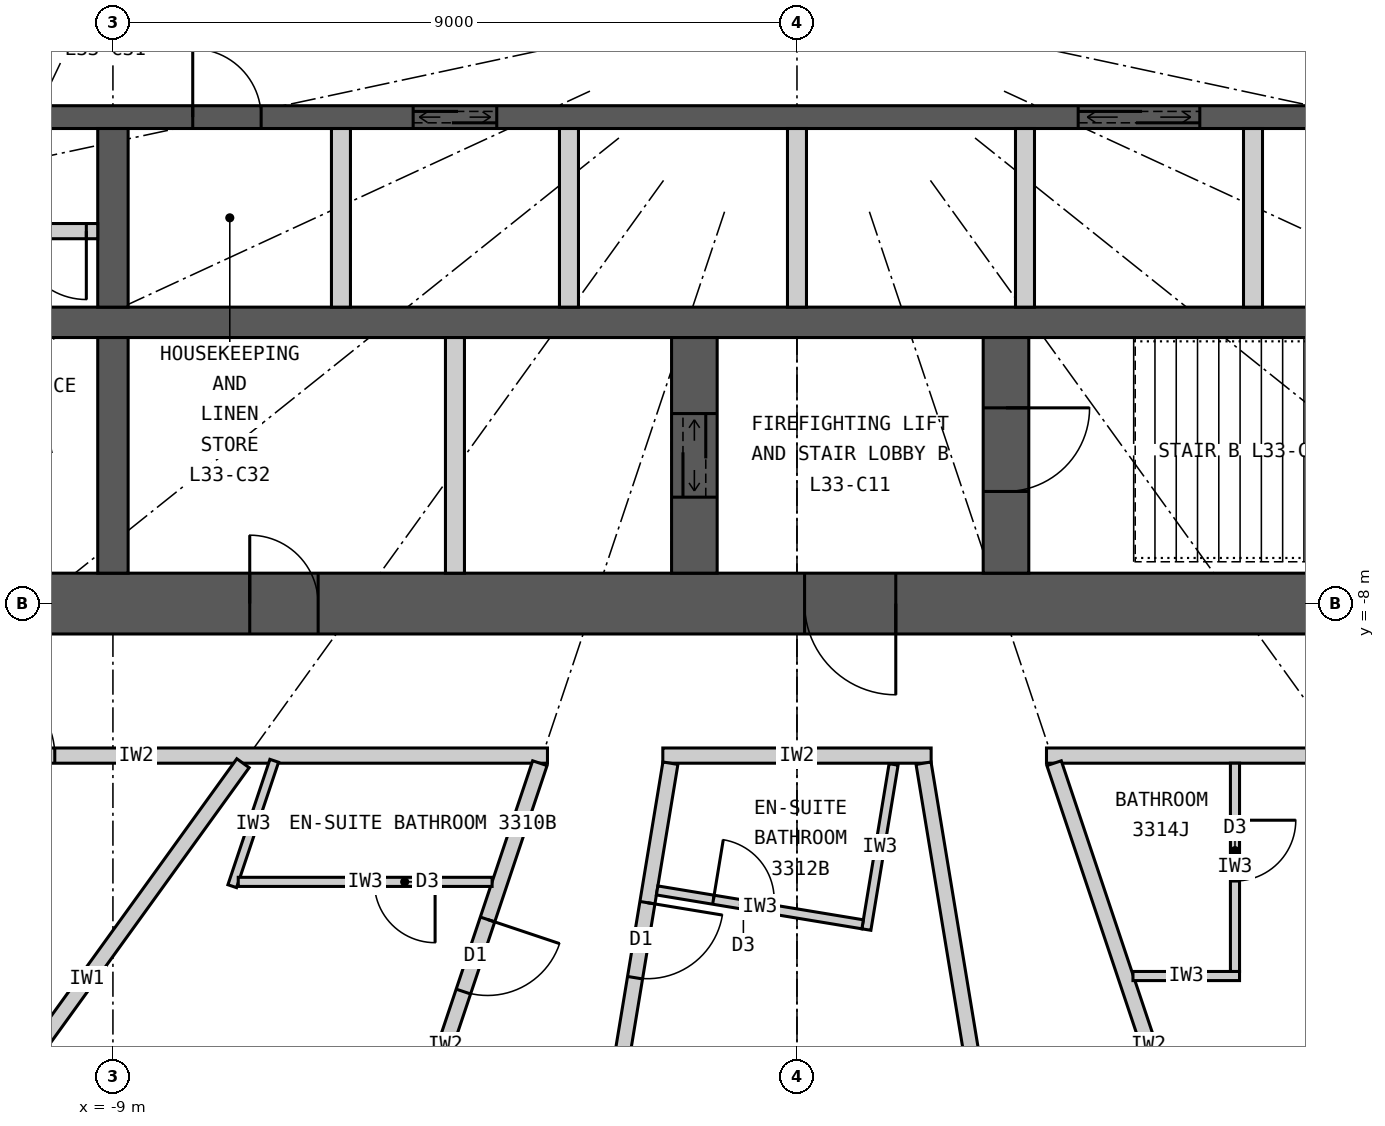
"""IFC4 building model, lengths in metres.
Left out: names, types, materials, properties, quantities, classifications, styles, units other than length and angle.
Written with IfcOpenShell. Run it as: python <this file> out.ifc"""

import sys

from ifc_helpers import new_model, si_unit, direction, frame, frame_2d, origin, place, context, subcontext, project, spatial, rectangle, extrude, element, fill, save


model = new_model("IFC4")
c1 = context("Model", 3, precision=1e-05, world=origin(), true_north=direction((0.0, 1.0)))
c2 = subcontext(c1, "Body", "Model", "MODEL_VIEW")
j1 = project(units=[si_unit("LENGTHUNIT", "METRE"), si_unit("PLANEANGLEUNIT", "RADIAN")], contexts=[c1])
p1 = place(None, origin())
s1 = spatial("IfcSite", under=j1, at=p1, CompositionType="ELEMENT")
p2 = place(p1, origin())
s2 = spatial("IfcBuilding", under=s1, at=p2, CompositionType="ELEMENT")
p3 = place(p2, frame((0.0, 0.0, 128.7)))
s3 = spatial("IfcBuildingStorey", under=s2, at=p3, CompositionType="ELEMENT", Elevation=128.7)
p4 = place(p3, frame((12.4, -8.0, 0.0), z_axis=(0.0, 0.0, 1.0), x_axis=(-1.0, 0.0, 0.0)))
e1 = element("IfcWall", 1, at=p4, inside=s3, PredefinedType="SHEAR", context=c2, shape_type="SweptSolid", body=[
    extrude(rectangle(XDim=24.8, YDim=0.8, at=frame_2d((12.4, 0.0))), origin(), (0.0, 0.0, 1.0), 3.3),
])
p5 = place(p4, frame((11.1, 0.0, 0.0)))
e2 = element("IfcOpeningElement", 2, at=p5, cuts=e1, PredefinedType="OPENING", context=c2, shape_type="SweptSolid", body=[
    extrude(rectangle(XDim=1.2, YDim=2.2, at=frame_2d((0.6, 1.1))), frame((0.0, 0.41, 0.0), z_axis=(0.0, -1.0, 0.0), x_axis=(1.0, 0.0, 0.0)), (0.0, 0.0, 1.0), 0.82),
])
p6 = place(p4, frame((18.7, 0.0, 0.0)))
e3 = element("IfcOpeningElement", 3, at=p6, cuts=e1, PredefinedType="OPENING", context=c2, shape_type="SweptSolid", body=[
    extrude(rectangle(XDim=0.9, YDim=2.2, at=frame_2d((0.45, 1.1))), frame((0.0, 0.41, 0.0), z_axis=(0.0, -1.0, 0.0), x_axis=(1.0, 0.0, 0.0)), (0.0, 0.0, 1.0), 0.82),
])
p7 = place(p3, frame((-11.6, -4.3, 0.0), z_axis=(0.0, 0.0, 1.0), x_axis=(1.0, 0.0, 0.0)))
e4 = element("IfcWall", 4, at=p7, inside=s3, PredefinedType="SHEAR", context=c2, shape_type="SweptSolid", body=[
    extrude(rectangle(XDim=23.2, YDim=0.4, at=frame_2d((11.6, 0.0))), origin(), (0.0, 0.0, 1.0), 3.3),
])
p8 = place(p3, frame((-11.6, -1.6, 0.0), z_axis=(0.0, 0.0, 1.0), x_axis=(1.0, 0.0, 0.0)))
e5 = element("IfcWall", 5, at=p8, inside=s3, PredefinedType="SHEAR", context=c2, shape_type="SweptSolid", body=[
    extrude(rectangle(XDim=23.2, YDim=0.3, at=frame_2d((11.6, 0.0))), origin(), (0.0, 0.0, 1.0), 3.3),
])
p9 = place(p8, frame((6.55, 0.0, 0.0)))
e6 = element("IfcOpeningElement", 6, at=p9, cuts=e5, PredefinedType="OPENING", context=c2, shape_type="SweptSolid", body=[
    extrude(rectangle(XDim=1.1, YDim=2.2, at=frame_2d((0.55, 1.1))), frame((0.0, 0.16, 0.0), z_axis=(0.0, -1.0, 0.0), x_axis=(1.0, 0.0, 0.0)), (0.0, 0.0, 1.0), 0.32),
])
p10 = place(p8, frame((15.3, 0.0, 0.0)))
e7 = element("IfcOpeningElement", 7, at=p10, cuts=e5, PredefinedType="OPENING", context=c2, shape_type="SweptSolid", body=[
    extrude(rectangle(XDim=1.6, YDim=2.4, at=frame_2d((0.8, 1.2))), frame((0.0, 0.16, 0.0), z_axis=(0.0, -1.0, 0.0), x_axis=(1.0, 0.0, 0.0)), (0.0, 0.0, 1.0), 0.32),
])
p11 = place(p8, frame((0.65, 0.0, 0.0)))
e8 = element("IfcOpeningElement", 8, at=p11, cuts=e5, PredefinedType="OPENING", context=c2, shape_type="SweptSolid", body=[
    extrude(rectangle(XDim=0.9, YDim=2.2, at=frame_2d((0.45, 1.1))), frame((0.0, 0.16, 0.0), z_axis=(0.0, -1.0, 0.0), x_axis=(1.0, 0.0, 0.0)), (0.0, 0.0, 1.0), 0.32),
])
p12 = place(p8, frame((3.65, 0.0, 0.0)))
e9 = element("IfcOpeningElement", 9, at=p12, cuts=e5, PredefinedType="OPENING", context=c2, shape_type="SweptSolid", body=[
    extrude(rectangle(XDim=0.9, YDim=2.2, at=frame_2d((0.45, 1.1))), frame((0.0, 0.16, 0.0), z_axis=(0.0, -1.0, 0.0), x_axis=(1.0, 0.0, 0.0)), (0.0, 0.0, 1.0), 0.32),
])
p13 = place(p8, frame((21.65, 0.0, 0.0)))
e10 = element("IfcOpeningElement", 10, at=p13, cuts=e5, PredefinedType="OPENING", context=c2, shape_type="SweptSolid", body=[
    extrude(rectangle(XDim=0.9, YDim=2.2, at=frame_2d((0.45, 1.1))), frame((0.0, 0.16, 0.0), z_axis=(0.0, -1.0, 0.0), x_axis=(1.0, 0.0, 0.0)), (0.0, 0.0, 1.0), 0.32),
])
p14 = place(p3, frame((-9.0, -4.1, 0.0), z_axis=(0.0, 0.0, 1.0), x_axis=(0.0, 1.0, 0.0)))
e11 = element("IfcWall", 11, at=p14, inside=s3, PredefinedType="SHEAR", context=c2, shape_type="SweptSolid", body=[
    extrude(rectangle(XDim=2.35, YDim=0.4, at=frame_2d((1.175, 0.0))), origin(), (0.0, 0.0, 1.0), 3.3),
])
p15 = place(p3, frame((-9.0, -7.6, 0.0), z_axis=(0.0, 0.0, 1.0), x_axis=(0.0, 1.0, 0.0)))
e12 = element("IfcWall", 12, at=p15, inside=s3, PredefinedType="SHEAR", context=c2, shape_type="SweptSolid", body=[
    extrude(rectangle(XDim=3.1, YDim=0.4, at=frame_2d((1.55, 0.0))), origin(), (0.0, 0.0, 1.0), 3.3),
])
p16 = place(p3, frame((2.75, -7.6, 0.0), z_axis=(0.0, 0.0, 1.0), x_axis=(0.0, 1.0, 0.0)))
e13 = element("IfcWall", 13, at=p16, inside=s3, PredefinedType="SHEAR", context=c2, shape_type="SweptSolid", body=[
    extrude(rectangle(XDim=3.1, YDim=0.6, at=frame_2d((1.55, 0.0))), origin(), (0.0, 0.0, 1.0), 3.3),
])
p17 = place(p16, frame((1.075, 0.0, 0.0)))
e14 = element("IfcOpeningElement", 14, at=p17, cuts=e13, PredefinedType="OPENING", context=c2, shape_type="SweptSolid", body=[
    extrude(rectangle(XDim=1.1, YDim=2.2, at=frame_2d((0.55, 1.1))), frame((0.0, 0.31, 0.0), z_axis=(0.0, -1.0, 0.0), x_axis=(1.0, 0.0, 0.0)), (0.0, 0.0, 1.0), 0.62),
])
p18 = place(p3, frame((-1.35, -7.6, 0.0), z_axis=(0.0, 0.0, 1.0), x_axis=(0.0, 1.0, 0.0)))
e15 = element("IfcWall", 15, at=p18, inside=s3, PredefinedType="SHEAR", context=c2, shape_type="SweptSolid", body=[
    extrude(rectangle(XDim=3.1, YDim=0.6, at=frame_2d((1.55, 0.0))), origin(), (0.0, 0.0, 1.0), 3.3),
])
p19 = place(p18, frame((1.0, 0.0, 0.0)))
e16 = element("IfcOpeningElement", 16, at=p19, cuts=e15, PredefinedType="OPENING", context=c2, shape_type="SweptSolid", body=[
    extrude(rectangle(XDim=1.1, YDim=2.2, at=frame_2d((0.55, 1.1))), frame((0.0, 0.31, 0.0), z_axis=(0.0, -1.0, 0.0), x_axis=(1.0, 0.0, 0.0)), (0.0, 0.0, 1.0), 0.62),
])
p20 = place(p3, frame((-4.5, -7.6, 0.0), z_axis=(0.0, 0.0, 1.0), x_axis=(0.0, 1.0, 0.0)))
e17 = element("IfcWall", 17, at=p20, inside=s3, PredefinedType="PARTITIONING", context=c2, shape_type="SweptSolid", body=[
    extrude(rectangle(XDim=3.1, YDim=0.25, at=frame_2d((1.55, 0.0))), origin(), (0.0, 0.0, 1.0), 3.3),
])
for number, where, z_axis, x_axis in (
    (18, (-6.0, -4.1, 0.0), (0.0, 0.0, 1.0), (0.0, 1.0, 0.0)),
    (19, (-3.0, -4.1, 0.0), (0.0, 0.0, 1.0), (0.0, 1.0, 0.0)),
    (20, (0.0, -4.1, 0.0), (0.0, 0.0, 1.0), (0.0, 1.0, 0.0)),
    (21, (3.0, -4.1, 0.0), (0.0, 0.0, 1.0), (0.0, 1.0, 0.0)),
    (22, (6.0, -4.1, 0.0), (0.0, 0.0, 1.0), (0.0, 1.0, 0.0)),
):
    element("IfcWall", number, at=place(p3, frame(where, z_axis=z_axis, x_axis=x_axis)), inside=s3, PredefinedType="PARTITIONING", context=c2, shape_type="SweptSolid", body=[
        extrude(rectangle(XDim=2.35, YDim=0.25, at=frame_2d((1.175, 0.0))), origin(), (0.0, 0.0, 1.0), 3.3),
    ])
p21 = place(p3, frame((14.1, -10.0, 0.0), z_axis=(0.0, 0.0, 1.0), x_axis=(-1.0, 0.0, 0.0)))
e23 = element("IfcWall", 23, at=p21, inside=s3, PredefinedType="PARTITIONING", context=c2, shape_type="SweptSolid", body=[
    extrude(rectangle(XDim=10.817, YDim=0.2, at=frame_2d((5.409, 0.0))), origin(), (0.0, 0.0, 1.0), 3.12),
])
p22 = place(p21, frame((3.035, 0.0, 0.0)))
e24 = element("IfcOpeningElement", 24, at=p22, cuts=e23, PredefinedType="OPENING", context=c2, shape_type="SweptSolid", body=[
    extrude(rectangle(XDim=1.0, YDim=2.2, at=frame_2d((0.5, 1.1))), frame((0.0, 0.11, 0.0), z_axis=(0.0, -1.0, 0.0), x_axis=(1.0, 0.0, 0.0)), (0.0, 0.0, 1.0), 0.22),
])
p23 = place(p3, frame((1.765, -10.0, 0.0), z_axis=(0.0, 0.0, 1.0), x_axis=(-1.0, 0.0, 0.0)))
e25 = element("IfcWall", 25, at=p23, inside=s3, PredefinedType="PARTITIONING", context=c2, shape_type="SweptSolid", body=[
    extrude(rectangle(XDim=3.53, YDim=0.2, at=frame_2d((1.765, 0.0))), origin(), (0.0, 0.0, 1.0), 3.12),
])
p24 = place(p3, frame((-3.283, -10.0, 0.0), z_axis=(0.0, 0.0, 1.0), x_axis=(-1.0, 0.0, 0.0)))
e26 = element("IfcWall", 26, at=p24, inside=s3, PredefinedType="PARTITIONING", context=c2, shape_type="SweptSolid", body=[
    extrude(rectangle(XDim=10.817, YDim=0.2, at=frame_2d((5.409, 0.0))), origin(), (0.0, 0.0, 1.0), 3.12),
])
p25 = place(p24, frame((6.482, 0.0, 0.0)))
e27 = element("IfcOpeningElement", 27, at=p25, cuts=e26, PredefinedType="OPENING", context=c2, shape_type="SweptSolid", body=[
    extrude(rectangle(XDim=1.0, YDim=2.2, at=frame_2d((0.5, 1.1))), frame((0.0, 0.11, 0.0), z_axis=(0.0, -1.0, 0.0), x_axis=(1.0, 0.0, 0.0)), (0.0, 0.0, 1.0), 0.22),
])
p26 = place(p3, frame((-7.289, -10.1, 0.0), z_axis=(0.0, 0.0, 1.0), x_axis=(-0.585217367024, -0.81087645997, 0.0)))
e28 = element("IfcWall", 28, at=p26, inside=s3, PredefinedType="PARTITIONING", context=c2, shape_type="SweptSolid", body=[
    extrude(rectangle(XDim=7.016, YDim=0.2, at=frame_2d((3.508, 0.0))), origin(), (0.0, 0.0, 1.0), 2.37),
])
p27 = place(p3, frame((-3.383, -10.1, 0.0), z_axis=(0.0, 0.0, 1.0), x_axis=(-0.317603705574, -0.948223542318, 0.0)))
e29 = element("IfcWall", 29, at=p27, inside=s3, PredefinedType="PARTITIONING", context=c2, shape_type="SweptSolid", body=[
    extrude(rectangle(XDim=7.823, YDim=0.2, at=frame_2d((3.912, 0.0))), origin(), (0.0, 0.0, 1.0), 2.37),
])
p28 = place(p27, frame((2.168, 0.0, 0.0)))
e30 = element("IfcOpeningElement", 30, at=p28, cuts=e29, PredefinedType="OPENING", context=c2, shape_type="SweptSolid", body=[
    extrude(rectangle(XDim=1.0, YDim=2.2, at=frame_2d((0.5, 1.1))), frame((0.0, 0.11, 0.0), z_axis=(0.0, -1.0, 0.0), x_axis=(1.0, 0.0, 0.0)), (0.0, 0.0, 1.0), 0.22),
])
p29 = place(p3, frame((-1.665, -10.1, 0.0), z_axis=(0.0, 0.0, 1.0), x_axis=(-0.162660519103, -0.986682094459, 0.0)))
e31 = element("IfcWall", 31, at=p29, inside=s3, PredefinedType="PARTITIONING", context=c2, shape_type="SweptSolid", body=[
    extrude(rectangle(XDim=9.111, YDim=0.2, at=frame_2d((4.555, 0.0))), origin(), (0.0, 0.0, 1.0), 3.12),
])
p30 = place(p29, frame((1.86, 0.0, 0.0)))
e32 = element("IfcOpeningElement", 32, at=p30, cuts=e31, PredefinedType="OPENING", context=c2, shape_type="SweptSolid", body=[
    extrude(rectangle(XDim=1.0, YDim=2.2, at=frame_2d((0.5, 1.1))), frame((0.0, 0.11, 0.0), z_axis=(0.0, -1.0, 0.0), x_axis=(1.0, 0.0, 0.0)), (0.0, 0.0, 1.0), 0.22),
])
p31 = place(p3, frame((1.665, -10.1, 0.0), z_axis=(0.0, 0.0, 1.0), x_axis=(0.162660519103, -0.986682094459, 0.0)))
e33 = element("IfcWall", 33, at=p31, inside=s3, PredefinedType="PARTITIONING", context=c2, shape_type="SweptSolid", body=[
    extrude(rectangle(XDim=9.111, YDim=0.2, at=frame_2d((4.555, 0.0))), origin(), (0.0, 0.0, 1.0), 3.12),
])
p32 = place(p3, frame((3.383, -10.1, 0.0), z_axis=(0.0, 0.0, 1.0), x_axis=(0.317603705574, -0.948223542318, 0.0)))
e34 = element("IfcWall", 34, at=p32, inside=s3, PredefinedType="PARTITIONING", context=c2, shape_type="SweptSolid", body=[
    extrude(rectangle(XDim=7.823, YDim=0.2, at=frame_2d((3.912, 0.0))), origin(), (0.0, 0.0, 1.0), 2.37),
])
p33 = place(p3, frame((-6.878, -10.068, 0.0), z_axis=(0.0, 0.0, 1.0), x_axis=(-0.317532394508, -0.948247424694, 0.0)))
e35 = element("IfcWall", 35, at=p33, inside=s3, PredefinedType="PARTITIONING", context=c2, shape_type="SweptSolid", body=[
    extrude(rectangle(XDim=1.74, YDim=0.12, at=frame_2d((0.87, 0.0))), origin(), (0.0, 0.0, 1.0), 3.12),
])
p34 = place(p3, frame((-4.011, -11.661, 0.0), z_axis=(0.0, 0.0, 1.0), x_axis=(-1.0, 0.0, 0.0)))
e36 = element("IfcWall", 36, at=p34, inside=s3, PredefinedType="PARTITIONING", context=c2, shape_type="SweptSolid", body=[
    extrude(rectangle(XDim=3.34, YDim=0.12, at=frame_2d((1.67, 0.0))), origin(), (0.0, 0.0, 1.0), 3.12),
])
p35 = place(p34, frame((0.75, 0.0, 0.0)))
e37 = element("IfcOpeningElement", 37, at=p35, cuts=e36, PredefinedType="OPENING", context=c2, shape_type="SweptSolid", body=[
    extrude(rectangle(XDim=0.8, YDim=2.1, at=frame_2d((0.4, 1.05))), frame((0.0, 0.07, 0.0), z_axis=(0.0, -1.0, 0.0), x_axis=(1.0, 0.0, 0.0)), (0.0, 0.0, 1.0), 0.14),
])
p36 = place(p3, frame((1.271, -10.116, 0.0), z_axis=(0.0, 0.0, 1.0), x_axis=(-0.162672481395, -0.986680122328, 0.0)))
e38 = element("IfcWall", 38, at=p36, inside=s3, PredefinedType="PARTITIONING", context=c2, shape_type="SweptSolid", body=[
    extrude(rectangle(XDim=2.202, YDim=0.12, at=frame_2d((1.101, 0.0))), origin(), (0.0, 0.0, 1.0), 3.12),
])
p37 = place(p3, frame((-1.84, -11.774, 0.0), z_axis=(0.0, 0.0, 1.0), x_axis=(0.986676602341, -0.162693830222, 0.0)))
e39 = element("IfcWall", 39, at=p37, inside=s3, PredefinedType="PARTITIONING", context=c2, shape_type="SweptSolid", body=[
    extrude(rectangle(XDim=2.74, YDim=0.12, at=frame_2d((1.37, 0.0))), origin(), (0.0, 0.0, 1.0), 3.12),
])
p38 = place(p37, frame((0.75, 0.0, 0.0)))
e40 = element("IfcOpeningElement", 40, at=p38, cuts=e39, PredefinedType="OPENING", context=c2, shape_type="SweptSolid", body=[
    extrude(rectangle(XDim=0.8, YDim=2.1, at=frame_2d((0.4, 1.05))), frame((0.0, 0.07, 0.0), z_axis=(0.0, -1.0, 0.0), x_axis=(1.0, 0.0, 0.0)), (0.0, 0.0, 1.0), 0.14),
])
p39 = place(p3, frame((4.421, -12.9, 0.0), z_axis=(0.0, 0.0, 1.0), x_axis=(1.0, 0.0, 0.0)))
e41 = element("IfcWall", 41, at=p39, inside=s3, PredefinedType="PARTITIONING", context=c2, shape_type="SweptSolid", body=[
    extrude(rectangle(XDim=1.402, YDim=0.12, at=frame_2d((0.701, 0.0))), origin(), (0.0, 0.0, 1.0), 3.12),
])
p40 = place(p3, frame((5.763, -10.1, 0.0), z_axis=(0.0, 0.0, 1.0), x_axis=(0.0, -1.0, 0.0)))
e42 = element("IfcWall", 42, at=p40, inside=s3, PredefinedType="PARTITIONING", context=c2, shape_type="SweptSolid", body=[
    extrude(rectangle(XDim=2.74, YDim=0.12, at=frame_2d((1.37, 0.0))), origin(), (0.0, 0.0, 1.0), 3.12),
])
p41 = place(p40, frame((0.75, 0.0, 0.0)))
e43 = element("IfcOpeningElement", 43, at=p41, cuts=e42, PredefinedType="OPENING", context=c2, shape_type="SweptSolid", body=[
    extrude(rectangle(XDim=0.8, YDim=2.1, at=frame_2d((0.4, 1.05))), frame((0.0, 0.07, 0.0), z_axis=(0.0, -1.0, 0.0), x_axis=(1.0, 0.0, 0.0)), (0.0, 0.0, 1.0), 0.14),
])
p42 = place(p3, frame((-11.6, -3.1, 0.0), z_axis=(0.0, 0.0, 1.0), x_axis=(1.0, 0.0, 0.0)))
e44 = element("IfcWall", 44, at=p42, inside=s3, PredefinedType="PARTITIONING", context=c2, shape_type="SweptSolid", body=[
    extrude(rectangle(XDim=2.4, YDim=0.2, at=frame_2d((1.2, 0.0))), origin(), (0.0, 0.0, 1.0), 3.12),
])
p43 = place(p42, frame((1.35, 0.0, 0.0)))
e45 = element("IfcOpeningElement", 45, at=p43, cuts=e44, PredefinedType="OPENING", context=c2, shape_type="SweptSolid", body=[
    extrude(rectangle(XDim=0.9, YDim=2.2, at=frame_2d((0.45, 1.1))), frame((0.0, 0.11, 0.0), z_axis=(0.0, -1.0, 0.0), x_axis=(1.0, 0.0, 0.0)), (0.0, 0.0, 1.0), 0.22),
])
p44 = place(p25, origin())
e46 = element("IfcDoor", 46, at=p44, inside=s3, OperationType="SINGLE_SWING_RIGHT", PredefinedType="DOOR", context=c2, shape_type="SweptSolid", body=[
    extrude(rectangle(XDim=1.0, YDim=2.2, at=frame_2d((0.5, 1.1))), frame((0.0, 0.025, 0.0), z_axis=(0.0, -1.0, 0.0), x_axis=(1.0, 0.0, 0.0)), (0.0, 0.0, 1.0), 0.05),
])
fill(e27, e46)
p45 = place(p35, origin())
e47 = element("IfcDoor", 47, at=p45, inside=s3, OperationType="SINGLE_SWING_LEFT", PredefinedType="DOOR", context=c2, shape_type="SweptSolid", body=[
    extrude(rectangle(XDim=0.8, YDim=2.1, at=frame_2d((0.4, 1.05))), frame((0.0, 0.025, 0.0), z_axis=(0.0, -1.0, 0.0), x_axis=(1.0, 0.0, 0.0)), (0.0, 0.0, 1.0), 0.05),
])
fill(e37, e47)
p46 = place(p28, origin())
e48 = element("IfcDoor", 48, at=p46, inside=s3, OperationType="SINGLE_SWING_LEFT", PredefinedType="DOOR", context=c2, shape_type="SweptSolid", body=[
    extrude(rectangle(XDim=1.0, YDim=2.2, at=frame_2d((0.5, 1.1))), frame((0.0, 0.025, 0.0), z_axis=(0.0, -1.0, 0.0), x_axis=(1.0, 0.0, 0.0)), (0.0, 0.0, 1.0), 0.05),
])
fill(e30, e48)
p47 = place(p38, origin())
e49 = element("IfcDoor", 49, at=p47, inside=s3, OperationType="SINGLE_SWING_LEFT", PredefinedType="DOOR", context=c2, shape_type="SweptSolid", body=[
    extrude(rectangle(XDim=0.8, YDim=2.1, at=frame_2d((0.4, 1.05))), frame((0.0, 0.025, 0.0), z_axis=(0.0, -1.0, 0.0), x_axis=(1.0, 0.0, 0.0)), (0.0, 0.0, 1.0), 0.05),
])
fill(e40, e49)
p48 = place(p30, origin())
e50 = element("IfcDoor", 50, at=p48, inside=s3, OperationType="SINGLE_SWING_LEFT", PredefinedType="DOOR", context=c2, shape_type="SweptSolid", body=[
    extrude(rectangle(XDim=1.0, YDim=2.2, at=frame_2d((0.5, 1.1))), frame((0.0, 0.025, 0.0), z_axis=(0.0, -1.0, 0.0), x_axis=(1.0, 0.0, 0.0)), (0.0, 0.0, 1.0), 0.05),
])
fill(e32, e50)
p49 = place(p41, origin())
e51 = element("IfcDoor", 51, at=p49, inside=s3, OperationType="SINGLE_SWING_LEFT", PredefinedType="DOOR", context=c2, shape_type="SweptSolid", body=[
    extrude(rectangle(XDim=0.8, YDim=2.1, at=frame_2d((0.4, 1.05))), frame((0.0, 0.025, 0.0), z_axis=(0.0, -1.0, 0.0), x_axis=(1.0, 0.0, 0.0)), (0.0, 0.0, 1.0), 0.05),
])
fill(e43, e51)
p50 = place(p5, origin())
e52 = element("IfcDoor", 52, at=p50, inside=s3, OperationType="SINGLE_SWING_LEFT", PredefinedType="DOOR", context=c2, shape_type="SweptSolid", body=[
    extrude(rectangle(XDim=1.2, YDim=2.2, at=frame_2d((0.6, 1.1))), frame((0.0, 0.025, 0.0), z_axis=(0.0, -1.0, 0.0), x_axis=(1.0, 0.0, 0.0)), (0.0, 0.0, 1.0), 0.05),
])
fill(e2, e52)
p51 = place(p17, origin())
e53 = element("IfcDoor", 53, at=p51, inside=s3, OperationType="SINGLE_SWING_RIGHT", PredefinedType="DOOR", context=c2, shape_type="SweptSolid", body=[
    extrude(rectangle(XDim=1.1, YDim=2.2, at=frame_2d((0.55, 1.1))), frame((0.0, 0.025, 0.0), z_axis=(0.0, -1.0, 0.0), x_axis=(1.0, 0.0, 0.0)), (0.0, 0.0, 1.0), 0.05),
])
fill(e14, e53)
p52 = place(p19, origin())
e54 = element("IfcDoor", 54, at=p52, inside=s3, OperationType="DOUBLE_DOOR_SLIDING", PredefinedType="DOOR", context=c2, shape_type="SweptSolid", body=[
    extrude(rectangle(XDim=1.1, YDim=2.2, at=frame_2d((0.55, 1.1))), frame((0.0, 0.025, 0.0), z_axis=(0.0, -1.0, 0.0), x_axis=(1.0, 0.0, 0.0)), (0.0, 0.0, 1.0), 0.05),
])
fill(e16, e54)
p53 = place(p6, origin())
e55 = element("IfcDoor", 55, at=p53, inside=s3, OperationType="SINGLE_SWING_RIGHT", PredefinedType="DOOR", context=c2, shape_type="SweptSolid", body=[
    extrude(rectangle(XDim=0.9, YDim=2.2, at=frame_2d((0.45, 1.1))), frame((0.0, 0.025, 0.0), z_axis=(0.0, -1.0, 0.0), x_axis=(1.0, 0.0, 0.0)), (0.0, 0.0, 1.0), 0.05),
])
fill(e3, e55)
p54 = place(p9, origin())
e56 = element("IfcDoor", 56, at=p54, inside=s3, OperationType="DOUBLE_DOOR_SLIDING", PredefinedType="DOOR", context=c2, shape_type="SweptSolid", body=[
    extrude(rectangle(XDim=1.1, YDim=2.2, at=frame_2d((0.55, 1.1))), frame((0.0, 0.025, 0.0), z_axis=(0.0, -1.0, 0.0), x_axis=(1.0, 0.0, 0.0)), (0.0, 0.0, 1.0), 0.05),
])
fill(e6, e56)
p55 = place(p10, origin())
e57 = element("IfcDoor", 57, at=p55, inside=s3, OperationType="DOUBLE_DOOR_SLIDING", PredefinedType="DOOR", context=c2, shape_type="SweptSolid", body=[
    extrude(rectangle(XDim=1.6, YDim=2.4, at=frame_2d((0.8, 1.2))), frame((0.0, 0.025, 0.0), z_axis=(0.0, -1.0, 0.0), x_axis=(1.0, 0.0, 0.0)), (0.0, 0.0, 1.0), 0.05),
])
fill(e7, e57)
p56 = place(p43, origin())
e58 = element("IfcDoor", 58, at=p56, inside=s3, OperationType="SINGLE_SWING_RIGHT", PredefinedType="DOOR", context=c2, shape_type="SweptSolid", body=[
    extrude(rectangle(XDim=0.9, YDim=2.2, at=frame_2d((0.45, 1.1))), frame((0.0, 0.025, 0.0), z_axis=(0.0, -1.0, 0.0), x_axis=(1.0, 0.0, 0.0)), (0.0, 0.0, 1.0), 0.05),
])
fill(e45, e58)
p57 = place(p12, origin())
e59 = element("IfcDoor", 59, at=p57, inside=s3, OperationType="SINGLE_SWING_LEFT", PredefinedType="DOOR", context=c2, shape_type="SweptSolid", body=[
    extrude(rectangle(XDim=0.9, YDim=2.2, at=frame_2d((0.45, 1.1))), frame((0.0, 0.025, 0.0), z_axis=(0.0, -1.0, 0.0), x_axis=(1.0, 0.0, 0.0)), (0.0, 0.0, 1.0), 0.05),
])
fill(e9, e59)
save(model, sys.argv[1])
